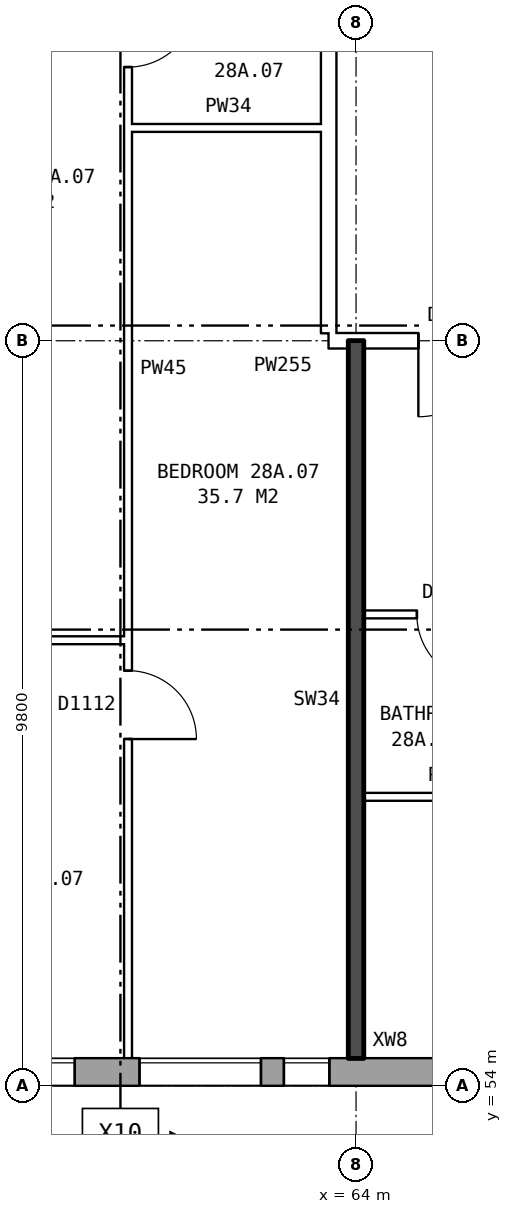
"""IFC4 building model, lengths in metres.
Left out: names, types, materials, properties, quantities, classifications, styles, units other than length and angle.
Written with IfcOpenShell. Run it as: python <this file> out.ifc"""

import sys

from ifc_helpers import new_model, si_unit, direction, frame, frame_2d, origin, place, context, subcontext, project, spatial, rectangle, extrude, element, fill, save


model = new_model("IFC4")
c1 = context("Model", 3, precision=1e-05, world=origin(), true_north=direction((0.0, 1.0)))
c2 = subcontext(c1, "Body", "Model", "MODEL_VIEW")
j1 = project(units=[si_unit("LENGTHUNIT", "METRE"), si_unit("PLANEANGLEUNIT", "RADIAN")], contexts=[c1])
p1 = place(None, origin())
s1 = spatial("IfcSite", under=j1, at=p1, CompositionType="ELEMENT")
p2 = place(p1, origin())
s2 = spatial("IfcBuilding", under=s1, at=p2, CompositionType="ELEMENT")
p3 = place(p2, frame((0.0, 0.0, 102.6)))
s3 = spatial("IfcBuildingStorey", under=s2, at=p3, CompositionType="ELEMENT", Elevation=102.6)
p4 = place(p3, frame((28.075, 54.18, 0.0), z_axis=(0.0, 0.0, 1.0), x_axis=(1.0, 0.0, 0.0)))
e1 = element("IfcWall", 1, at=p4, inside=s3, PredefinedType="STANDARD", context=c2, shape_type="SweptSolid", body=[
    extrude(rectangle(XDim=44.851, YDim=0.36, at=frame_2d((22.425, 0.0))), origin(), (0.0, 0.0, 1.0), 2.85),
])
p5 = place(p4, frame((0.625, 0.0, 0.8)))
e2 = element("IfcOpeningElement", 2, at=p5, cuts=e1, PredefinedType="OPENING", context=c2, shape_type="SweptSolid", body=[
    extrude(rectangle(XDim=1.6, YDim=1.8, at=frame_2d((0.8, 0.9))), frame((0.0, 0.19, 0.0), z_axis=(0.0, -1.0, 0.0), x_axis=(1.0, 0.0, 0.0)), (0.0, 0.0, 1.0), 0.38),
])
p6 = place(p4, frame((3.625, 0.0, 0.8)))
e3 = element("IfcOpeningElement", 3, at=p6, cuts=e1, PredefinedType="OPENING", context=c2, shape_type="SweptSolid", body=[
    extrude(rectangle(XDim=1.6, YDim=1.8, at=frame_2d((0.8, 0.9))), frame((0.0, 0.19, 0.0), z_axis=(0.0, -1.0, 0.0), x_axis=(1.0, 0.0, 0.0)), (0.0, 0.0, 1.0), 0.38),
])
p7 = place(p4, frame((6.125, 0.0, 1.0)))
e4 = element("IfcOpeningElement", 4, at=p7, cuts=e1, PredefinedType="OPENING", context=c2, shape_type="SweptSolid", body=[
    extrude(rectangle(XDim=0.6, YDim=1.5, at=frame_2d((0.3, 0.75))), frame((0.0, 0.19, 0.0), z_axis=(0.0, -1.0, 0.0), x_axis=(1.0, 0.0, 0.0)), (0.0, 0.0, 1.0), 0.38),
])
p8 = place(p4, frame((7.025, 0.0, 1.7)))
e5 = element("IfcOpeningElement", 5, at=p8, cuts=e1, PredefinedType="OPENING", context=c2, shape_type="SweptSolid", body=[
    extrude(rectangle(XDim=0.6, YDim=0.9, at=frame_2d((0.3, 0.45))), frame((0.0, 0.19, 0.0), z_axis=(0.0, -1.0, 0.0), x_axis=(1.0, 0.0, 0.0)), (0.0, 0.0, 1.0), 0.38),
])
p9 = place(p4, frame((12.625, 0.0, 0.8)))
e6 = element("IfcOpeningElement", 6, at=p9, cuts=e1, PredefinedType="OPENING", context=c2, shape_type="SweptSolid", body=[
    extrude(rectangle(XDim=1.6, YDim=1.8, at=frame_2d((0.8, 0.9))), frame((0.0, 0.19, 0.0), z_axis=(0.0, -1.0, 0.0), x_axis=(1.0, 0.0, 0.0)), (0.0, 0.0, 1.0), 0.38),
])
p10 = place(p4, frame((15.625, 0.0, 0.8)))
e7 = element("IfcOpeningElement", 7, at=p10, cuts=e1, PredefinedType="OPENING", context=c2, shape_type="SweptSolid", body=[
    extrude(rectangle(XDim=1.6, YDim=1.8, at=frame_2d((0.8, 0.9))), frame((0.0, 0.19, 0.0), z_axis=(0.0, -1.0, 0.0), x_axis=(1.0, 0.0, 0.0)), (0.0, 0.0, 1.0), 0.38),
])
p11 = place(p4, frame((18.625, 0.0, 0.8)))
e8 = element("IfcOpeningElement", 8, at=p11, cuts=e1, PredefinedType="OPENING", context=c2, shape_type="SweptSolid", body=[
    extrude(rectangle(XDim=1.6, YDim=1.8, at=frame_2d((0.8, 0.9))), frame((0.0, 0.19, 0.0), z_axis=(0.0, -1.0, 0.0), x_axis=(1.0, 0.0, 0.0)), (0.0, 0.0, 1.0), 0.38),
])
p12 = place(p4, frame((21.625, 0.0, 0.8)))
e9 = element("IfcOpeningElement", 9, at=p12, cuts=e1, PredefinedType="OPENING", context=c2, shape_type="SweptSolid", body=[
    extrude(rectangle(XDim=1.6, YDim=1.8, at=frame_2d((0.8, 0.9))), frame((0.0, 0.19, 0.0), z_axis=(0.0, -1.0, 0.0), x_axis=(1.0, 0.0, 0.0)), (0.0, 0.0, 1.0), 0.38),
])
p13 = place(p4, frame((24.625, 0.0, 0.8)))
e10 = element("IfcOpeningElement", 10, at=p13, cuts=e1, PredefinedType="OPENING", context=c2, shape_type="SweptSolid", body=[
    extrude(rectangle(XDim=1.6, YDim=1.8, at=frame_2d((0.8, 0.9))), frame((0.0, 0.19, 0.0), z_axis=(0.0, -1.0, 0.0), x_axis=(1.0, 0.0, 0.0)), (0.0, 0.0, 1.0), 0.38),
])
p14 = place(p4, frame((27.625, 0.0, 0.8)))
e11 = element("IfcOpeningElement", 11, at=p14, cuts=e1, PredefinedType="OPENING", context=c2, shape_type="SweptSolid", body=[
    extrude(rectangle(XDim=1.6, YDim=1.8, at=frame_2d((0.8, 0.9))), frame((0.0, 0.19, 0.0), z_axis=(0.0, -1.0, 0.0), x_axis=(1.0, 0.0, 0.0)), (0.0, 0.0, 1.0), 0.38),
])
p15 = place(p4, frame((30.625, 0.0, 0.8)))
e12 = element("IfcOpeningElement", 12, at=p15, cuts=e1, PredefinedType="OPENING", context=c2, shape_type="SweptSolid", body=[
    extrude(rectangle(XDim=1.6, YDim=1.8, at=frame_2d((0.8, 0.9))), frame((0.0, 0.19, 0.0), z_axis=(0.0, -1.0, 0.0), x_axis=(1.0, 0.0, 0.0)), (0.0, 0.0, 1.0), 0.38),
])
p16 = place(p4, frame((33.075, 0.0, 0.8)))
e13 = element("IfcOpeningElement", 13, at=p16, cuts=e1, PredefinedType="OPENING", context=c2, shape_type="SweptSolid", body=[
    extrude(rectangle(XDim=1.6, YDim=1.8, at=frame_2d((0.8, 0.9))), frame((0.0, 0.19, 0.0), z_axis=(0.0, -1.0, 0.0), x_axis=(1.0, 0.0, 0.0)), (0.0, 0.0, 1.0), 0.38),
])
p17 = place(p4, frame((37.175, 0.0, 1.7)))
e14 = element("IfcOpeningElement", 14, at=p17, cuts=e1, PredefinedType="OPENING", context=c2, shape_type="SweptSolid", body=[
    extrude(rectangle(XDim=1.0, YDim=0.9, at=frame_2d((0.5, 0.45))), frame((0.0, 0.19, 0.0), z_axis=(0.0, -1.0, 0.0), x_axis=(1.0, 0.0, 0.0)), (0.0, 0.0, 1.0), 0.38),
])
p18 = place(p4, frame((39.625, 0.0, 0.8)))
e15 = element("IfcOpeningElement", 15, at=p18, cuts=e1, PredefinedType="OPENING", context=c2, shape_type="SweptSolid", body=[
    extrude(rectangle(XDim=1.6, YDim=1.8, at=frame_2d((0.8, 0.9))), frame((0.0, 0.19, 0.0), z_axis=(0.0, -1.0, 0.0), x_axis=(1.0, 0.0, 0.0)), (0.0, 0.0, 1.0), 0.38),
])
p19 = place(p4, frame((42.625, 0.0, 0.8)))
e16 = element("IfcOpeningElement", 16, at=p19, cuts=e1, PredefinedType="OPENING", context=c2, shape_type="SweptSolid", body=[
    extrude(rectangle(XDim=1.6, YDim=1.8, at=frame_2d((0.8, 0.9))), frame((0.0, 0.19, 0.0), z_axis=(0.0, -1.0, 0.0), x_axis=(1.0, 0.0, 0.0)), (0.0, 0.0, 1.0), 0.38),
])
p20 = place(p4, frame((8.925, 0.0, 0.8)))
e17 = element("IfcOpeningElement", 17, at=p20, cuts=e1, PredefinedType="OPENING", context=c2, shape_type="SweptSolid", body=[
    extrude(rectangle(XDim=1.0, YDim=0.9, at=frame_2d((0.5, 0.45))), frame((0.0, 0.19, 0.0), z_axis=(0.0, -1.0, 0.0), x_axis=(1.0, 0.0, 0.0)), (0.0, 0.0, 1.0), 0.38),
])
p21 = place(p4, frame((10.225, 0.0, 0.8)))
e18 = element("IfcOpeningElement", 18, at=p21, cuts=e1, PredefinedType="OPENING", context=c2, shape_type="SweptSolid", body=[
    extrude(rectangle(XDim=1.4, YDim=1.8, at=frame_2d((0.7, 0.9))), frame((0.0, 0.19, 0.0), z_axis=(0.0, -1.0, 0.0), x_axis=(1.0, 0.0, 0.0)), (0.0, 0.0, 1.0), 0.38),
])
p22 = place(p4, frame((34.975, 0.0, 0.8)))
e19 = element("IfcOpeningElement", 19, at=p22, cuts=e1, PredefinedType="OPENING", context=c2, shape_type="SweptSolid", body=[
    extrude(rectangle(XDim=0.6, YDim=0.9, at=frame_2d((0.3, 0.45))), frame((0.0, 0.19, 0.0), z_axis=(0.0, -1.0, 0.0), x_axis=(1.0, 0.0, 0.0)), (0.0, 0.0, 1.0), 0.38),
])
p23 = place(p4, frame((38.475, 0.0, 0.8)))
e20 = element("IfcOpeningElement", 20, at=p23, cuts=e1, PredefinedType="OPENING", context=c2, shape_type="SweptSolid", body=[
    extrude(rectangle(XDim=0.8, YDim=1.8, at=frame_2d((0.4, 0.9))), frame((0.0, 0.19, 0.0), z_axis=(0.0, -1.0, 0.0), x_axis=(1.0, 0.0, 0.0)), (0.0, 0.0, 1.0), 0.38),
])
p24 = place(p3, frame((63.64, 63.9, 0.0), z_axis=(0.0, 0.0, 1.0), x_axis=(0.0, 1.0, 0.0)))
e21 = element("IfcWall", 21, at=p24, inside=s3, PredefinedType="PARTITIONING", context=c2, shape_type="SweptSolid", body=[
    extrude(rectangle(XDim=12.2, YDim=0.2, at=frame_2d((6.1, 0.0))), origin(), (0.0, 0.0, 1.0), 2.85),
])
p25 = place(p24, frame((5.1, 0.0, 0.0)))
e22 = element("IfcOpeningElement", 22, at=p25, cuts=e21, PredefinedType="OPENING", context=c2, shape_type="SweptSolid", body=[
    extrude(rectangle(XDim=2.0, YDim=2.1, at=frame_2d((1.0, 1.05))), frame((0.0, 0.11, 0.0), z_axis=(0.0, -1.0, 0.0), x_axis=(1.0, 0.0, 0.0)), (0.0, 0.0, 1.0), 0.22),
])
p26 = place(p3, frame((64.1, 57.8, 0.0), z_axis=(0.0, 0.0, 1.0), x_axis=(1.0, 0.0, 0.0)))
e23 = element("IfcWall", 23, at=p26, inside=s3, PredefinedType="PARTITIONING", context=c2, shape_type="SweptSolid", body=[
    extrude(rectangle(XDim=2.3, YDim=0.1, at=frame_2d((1.15, 0.0))), origin(), (0.0, 0.0, 1.0), 2.85),
])
p27 = place(p3, frame((55.0, 59.86, 0.0), z_axis=(0.0, 0.0, 1.0), x_axis=(1.0, 0.0, 0.0)))
e24 = element("IfcWall", 24, at=p27, inside=s3, PredefinedType="PARTITIONING", context=c2, shape_type="SweptSolid", body=[
    extrude(rectangle(XDim=6.0, YDim=0.1, at=frame_2d((3.0, 0.0))), origin(), (0.0, 0.0, 1.0), 2.85),
])
p28 = place(p27, frame((4.05, 0.0, 0.0)))
e25 = element("IfcOpeningElement", 25, at=p28, cuts=e24, PredefinedType="OPENING", context=c2, shape_type="SweptSolid", body=[
    extrude(rectangle(XDim=0.9, YDim=2.1, at=frame_2d((0.45, 1.05))), frame((0.0, 0.06, 0.0), z_axis=(0.0, -1.0, 0.0), x_axis=(1.0, 0.0, 0.0)), (0.0, 0.0, 1.0), 0.12),
])
p29 = place(p27, frame((1.05, 0.0, 0.0)))
e26 = element("IfcOpeningElement", 26, at=p29, cuts=e24, PredefinedType="OPENING", context=c2, shape_type="SweptSolid", body=[
    extrude(rectangle(XDim=0.9, YDim=2.1, at=frame_2d((0.45, 1.05))), frame((0.0, 0.06, 0.0), z_axis=(0.0, -1.0, 0.0), x_axis=(1.0, 0.0, 0.0)), (0.0, 0.0, 1.0), 0.12),
])
p30 = place(p3, frame((64.1, 60.2, 0.0), z_axis=(0.0, 0.0, 1.0), x_axis=(1.0, 0.0, 0.0)))
e27 = element("IfcWall", 27, at=p30, inside=s3, PredefinedType="PARTITIONING", context=c2, shape_type="SweptSolid", body=[
    extrude(rectangle(XDim=5.8, YDim=0.1, at=frame_2d((2.9, 0.0))), origin(), (0.0, 0.0, 1.0), 2.85),
])
p31 = place(p30, frame((3.6, 0.0, 0.0)))
e28 = element("IfcOpeningElement", 28, at=p31, cuts=e27, PredefinedType="OPENING", context=c2, shape_type="SweptSolid", body=[
    extrude(rectangle(XDim=0.9, YDim=2.1, at=frame_2d((0.45, 1.05))), frame((0.0, 0.06, 0.0), z_axis=(0.0, -1.0, 0.0), x_axis=(1.0, 0.0, 0.0)), (0.0, 0.0, 1.0), 0.12),
])
p32 = place(p30, frame((0.7, 0.0, 0.0)))
e29 = element("IfcOpeningElement", 29, at=p32, cuts=e27, PredefinedType="OPENING", context=c2, shape_type="SweptSolid", body=[
    extrude(rectangle(XDim=0.9, YDim=2.1, at=frame_2d((0.45, 1.05))), frame((0.0, 0.06, 0.0), z_axis=(0.0, -1.0, 0.0), x_axis=(1.0, 0.0, 0.0)), (0.0, 0.0, 1.0), 0.12),
])
p33 = place(p3, frame((63.64, 63.8, 0.0), z_axis=(0.0, 0.0, 1.0), x_axis=(1.0, 0.0, 0.0)))
e30 = element("IfcWall", 30, at=p33, inside=s3, PredefinedType="PARTITIONING", context=c2, shape_type="SweptSolid", body=[
    extrude(rectangle(XDim=3.0, YDim=0.2, at=frame_2d((1.5, 0.0))), origin(), (0.0, 0.0, 1.0), 2.85),
])
p34 = place(p33, frame((1.18, 0.0, 0.0)))
e31 = element("IfcOpeningElement", 31, at=p34, cuts=e30, PredefinedType="OPENING", context=c2, shape_type="SweptSolid", body=[
    extrude(rectangle(XDim=1.0, YDim=2.1, at=frame_2d((0.5, 1.05))), frame((0.0, 0.11, 0.0), z_axis=(0.0, -1.0, 0.0), x_axis=(1.0, 0.0, 0.0)), (0.0, 0.0, 1.0), 0.22),
])
p35 = place(p3, frame((61.0, 66.6, 0.0), z_axis=(0.0, 0.0, 1.0), x_axis=(1.0, 0.0, 0.0)))
e32 = element("IfcWall", 32, at=p35, inside=s3, PredefinedType="PARTITIONING", context=c2, shape_type="SweptSolid", body=[
    extrude(rectangle(XDim=2.64, YDim=0.1, at=frame_2d((1.32, 0.0))), origin(), (0.0, 0.0, 1.0), 2.85),
])
p36 = place(p3, frame((61.0, 54.36, 0.0), z_axis=(0.0, 0.0, 1.0), x_axis=(0.0, 1.0, 0.0)))
e33 = element("IfcWall", 33, at=p36, inside=s3, PredefinedType="PARTITIONING", context=c2, shape_type="SweptSolid", body=[
    extrude(rectangle(XDim=14.34, YDim=0.1, at=frame_2d((7.17, 0.0))), origin(), (0.0, 0.0, 1.0), 2.85),
])
p37 = place(p36, frame((4.2, 0.0, 0.0)))
e34 = element("IfcOpeningElement", 34, at=p37, cuts=e33, PredefinedType="OPENING", context=c2, shape_type="SweptSolid", body=[
    extrude(rectangle(XDim=0.9, YDim=2.1, at=frame_2d((0.45, 1.05))), frame((0.0, 0.06, 0.0), z_axis=(0.0, -1.0, 0.0), x_axis=(1.0, 0.0, 0.0)), (0.0, 0.0, 1.0), 0.12),
])
p38 = place(p36, frame((13.04, 0.0, 0.0)))
e35 = element("IfcOpeningElement", 35, at=p38, cuts=e33, PredefinedType="OPENING", context=c2, shape_type="SweptSolid", body=[
    extrude(rectangle(XDim=0.9, YDim=2.1, at=frame_2d((0.45, 1.05))), frame((0.0, 0.06, 0.0), z_axis=(0.0, -1.0, 0.0), x_axis=(1.0, 0.0, 0.0)), (0.0, 0.0, 1.0), 0.12),
])
p39 = place(p3, frame((64.0, 54.36, 0.0), z_axis=(0.0, 0.0, 1.0), x_axis=(0.0, 1.0, 0.0)))
e36 = element("IfcWall", 36, at=p39, inside=s3, PredefinedType="SOLIDWALL", context=c2, shape_type="SweptSolid", body=[
    extrude(rectangle(XDim=9.44, YDim=0.2, at=frame_2d((4.72, 0.0))), origin(), (0.0, 0.0, 1.0), 2.85),
])
p40 = place(p15, origin())
e37 = element("IfcWindow", 37, at=p40, inside=s3, PartitioningType="SINGLE_PANEL", PredefinedType="WINDOW", context=c2, shape_type="SweptSolid", body=[
    extrude(rectangle(XDim=1.6, YDim=1.8, at=frame_2d((0.8, 0.9))), frame((0.0, 0.15, 0.0), z_axis=(0.0, -1.0, 0.0), x_axis=(1.0, 0.0, 0.0)), (0.0, 0.0, 1.0), 0.06),
])
fill(e12, e37)
p41 = place(p16, origin())
e38 = element("IfcWindow", 38, at=p41, inside=s3, PartitioningType="SINGLE_PANEL", PredefinedType="WINDOW", context=c2, shape_type="SweptSolid", body=[
    extrude(rectangle(XDim=1.6, YDim=1.8, at=frame_2d((0.8, 0.9))), frame((0.0, 0.15, 0.0), z_axis=(0.0, -1.0, 0.0), x_axis=(1.0, 0.0, 0.0)), (0.0, 0.0, 1.0), 0.06),
])
fill(e13, e38)
p42 = place(p34, frame((1.0, 0.0, 0.0), z_axis=(0.0, 0.0, 1.0), x_axis=(-1.0, 0.0, 0.0)))
e39 = element("IfcDoor", 39, at=p42, inside=s3, OperationType="SINGLE_SWING_RIGHT", PredefinedType="DOOR", context=c2, shape_type="SweptSolid", body=[
    extrude(rectangle(XDim=1.0, YDim=2.1, at=frame_2d((0.5, 1.05))), frame((0.0, 0.025, 0.0), z_axis=(0.0, -1.0, 0.0), x_axis=(1.0, 0.0, 0.0)), (0.0, 0.0, 1.0), 0.05),
])
fill(e31, e39)
p43 = place(p32, frame((0.9, 0.0, 0.0), z_axis=(0.0, 0.0, 1.0), x_axis=(-1.0, 0.0, 0.0)))
e40 = element("IfcDoor", 40, at=p43, inside=s3, OperationType="SINGLE_SWING_LEFT", PredefinedType="DOOR", context=c2, shape_type="SweptSolid", body=[
    extrude(rectangle(XDim=0.9, YDim=2.1, at=frame_2d((0.45, 1.05))), frame((0.0, 0.025, 0.0), z_axis=(0.0, -1.0, 0.0), x_axis=(1.0, 0.0, 0.0)), (0.0, 0.0, 1.0), 0.05),
])
fill(e29, e40)
p44 = place(p37, frame((0.9, 0.0, 0.0), z_axis=(0.0, 0.0, 1.0), x_axis=(-1.0, 0.0, 0.0)))
e41 = element("IfcDoor", 41, at=p44, inside=s3, OperationType="SINGLE_SWING_RIGHT", PredefinedType="DOOR", context=c2, shape_type="SweptSolid", body=[
    extrude(rectangle(XDim=0.9, YDim=2.1, at=frame_2d((0.45, 1.05))), frame((0.0, 0.025, 0.0), z_axis=(0.0, -1.0, 0.0), x_axis=(1.0, 0.0, 0.0)), (0.0, 0.0, 1.0), 0.05),
])
fill(e34, e41)
p45 = place(p38, frame((0.9, 0.0, 0.0), z_axis=(0.0, 0.0, 1.0), x_axis=(-1.0, 0.0, 0.0)))
e42 = element("IfcDoor", 42, at=p45, inside=s3, OperationType="SINGLE_SWING_LEFT", PredefinedType="DOOR", context=c2, shape_type="SweptSolid", body=[
    extrude(rectangle(XDim=0.9, YDim=2.1, at=frame_2d((0.45, 1.05))), frame((0.0, 0.025, 0.0), z_axis=(0.0, -1.0, 0.0), x_axis=(1.0, 0.0, 0.0)), (0.0, 0.0, 1.0), 0.05),
])
fill(e35, e42)
p46 = place(p22, origin())
e43 = element("IfcWindow", 43, at=p46, inside=s3, PartitioningType="SINGLE_PANEL", PredefinedType="WINDOW", context=c2, shape_type="SweptSolid", body=[
    extrude(rectangle(XDim=0.6, YDim=0.9, at=frame_2d((0.3, 0.45))), frame((0.0, 0.15, 0.0), z_axis=(0.0, -1.0, 0.0), x_axis=(1.0, 0.0, 0.0)), (0.0, 0.0, 1.0), 0.06),
])
fill(e19, e43)
save(model, sys.argv[1])
